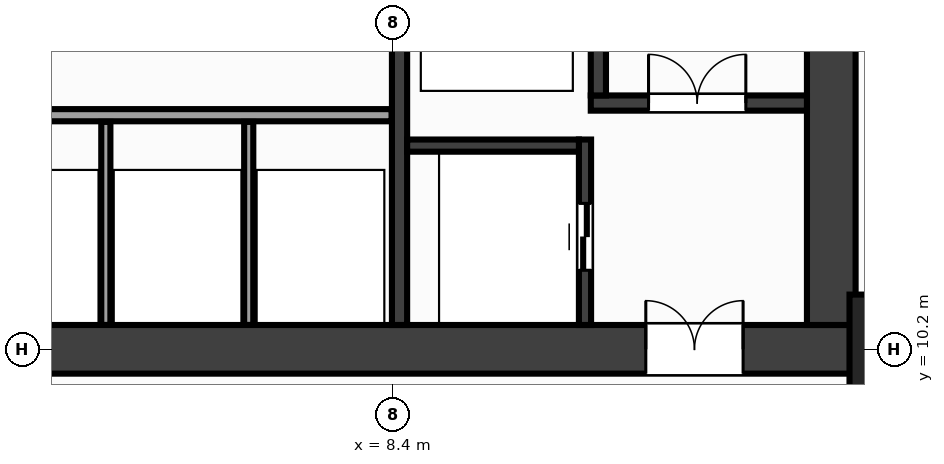
"""IFC4 building model, lengths in metres.
Left out: names, types, materials, properties, quantities, classifications, styles, units other than length and angle.
Written with IfcOpenShell. Run it as: python <this file> out.ifc"""

import sys

from ifc_helpers import new_model, si_unit, direction, frame, frame_2d, origin, origin_2d, place, context, subcontext, project, spatial, rectangle, extrude, source, transform, mapped, element, fill, save


model = new_model("IFC4")
c1 = context("Model", 3, precision=1e-05, world=origin(), true_north=direction((0.0, 1.0)))
c2 = subcontext(c1, "Body", "Model", "MODEL_VIEW")
j1 = project(units=[si_unit("LENGTHUNIT", "METRE"), si_unit("PLANEANGLEUNIT", "RADIAN")], contexts=[c1])
p1 = place(None, origin())
s1 = spatial("IfcSite", under=j1, at=p1, CompositionType="ELEMENT")
p2 = place(p1, origin())
s2 = spatial("IfcBuilding", under=s1, at=p2, CompositionType="ELEMENT")
p3 = place(p2, frame((0.0, 0.0, 66.8)))
s3 = spatial("IfcBuildingStorey", under=s2, at=p3, CompositionType="ELEMENT", Elevation=66.8)
m1 = source(origin(), c2, "Body", "SweptSolid", [
    extrude(rectangle(XDim=32.0, YDim=0.8, at=frame_2d((16.0, 0.0))), origin(), (0.0, 0.0, 1.0), 3.6),
])
p4 = place(p3, frame((-16.0, 10.2, 0.0), z_axis=(0.0, 0.0, 1.0), x_axis=(1.0, 0.0, 0.0)))
e1 = element("IfcWall", 1, at=p4, inside=s3, PredefinedType="SHEAR", context=c2, shape_type="MappedRepresentation", body=[
    mapped(m1, transform((0.0, 0.0, 0.0), x_axis=(1.0, 0.0, 0.0), y_axis=(0.0, 1.0, 0.0), z_axis=(0.0, 0.0, 1.0), scale=1.0)),
])
p5 = place(p4, frame((1.85, 0.0, 0.0)))
e2 = element("IfcOpeningElement", 2, at=p5, cuts=e1, PredefinedType="OPENING", context=c2, shape_type="SweptSolid", body=[
    extrude(rectangle(XDim=1.6, YDim=2.15, at=frame_2d((0.8, 1.075))), frame((0.0, 0.412, 0.0), z_axis=(0.0, -1.0, 0.0), x_axis=(1.0, 0.0, 0.0)), (0.0, 0.0, 1.0), 0.824),
])
p6 = place(p4, frame((28.55, 0.0, 0.0)))
e3 = element("IfcOpeningElement", 3, at=p6, cuts=e1, PredefinedType="OPENING", context=c2, shape_type="SweptSolid", body=[
    extrude(rectangle(XDim=1.6, YDim=2.15, at=frame_2d((0.8, 1.075))), frame((0.0, 0.412, 0.0), z_axis=(0.0, -1.0, 0.0), x_axis=(1.0, 0.0, 0.0)), (0.0, 0.0, 1.0), 0.824),
])
p7 = place(p4, frame((15.25, 0.0, 0.0)))
e4 = element("IfcOpeningElement", 4, at=p7, cuts=e1, PredefinedType="OPENING", context=c2, shape_type="SweptSolid", body=[
    extrude(rectangle(XDim=1.5, YDim=2.2, at=frame_2d((0.75, 1.1))), frame((0.0, 0.412, 0.0), z_axis=(0.0, -1.0, 0.0), x_axis=(1.0, 0.0, 0.0)), (0.0, 0.0, 1.0), 0.824),
])
m2 = source(origin(), c2, "Body", "SweptSolid", [
    extrude(rectangle(XDim=12.8, YDim=0.8, at=frame_2d((6.4, 0.0))), origin(), (0.0, 0.0, 1.0), 3.6),
])
p8 = place(p3, frame((15.6, 10.6, 0.0), z_axis=(0.0, 0.0, 1.0), x_axis=(0.0, 1.0, 0.0)))
e5 = element("IfcWall", 5, at=p8, inside=s3, PredefinedType="SHEAR", context=c2, shape_type="MappedRepresentation", body=[
    mapped(m2, transform((0.0, 0.0, 0.0), x_axis=(1.0, 0.0, 0.0), y_axis=(0.0, 1.0, 0.0), z_axis=(0.0, 0.0, 1.0), scale=1.0)),
])
m3 = source(origin(), c2, "Body", "SweptSolid", [
    extrude(rectangle(XDim=12.8, YDim=0.25, at=frame_2d((6.4, 0.0))), origin(), (0.0, 0.0, 1.0), 3.6),
])
p9 = place(p3, frame((8.5, 10.6, 0.0), z_axis=(0.0, 0.0, 1.0), x_axis=(0.0, 1.0, 0.0)))
e6 = element("IfcWall", 6, at=p9, inside=s3, PredefinedType="SHEAR", context=c2, shape_type="MappedRepresentation", body=[
    mapped(m3, transform((0.0, 0.0, 0.0), x_axis=(1.0, 0.0, 0.0), y_axis=(0.0, 1.0, 0.0), z_axis=(0.0, 0.0, 1.0), scale=1.0)),
])
p10 = place(p9, frame((9.85, 0.0, 0.0)))
e7 = element("IfcOpeningElement", 7, at=p10, cuts=e6, PredefinedType="OPENING", context=c2, shape_type="SweptSolid", body=[
    extrude(rectangle(XDim=0.95, YDim=2.15, at=frame_2d((0.475, 1.075))), frame((0.0, 0.137, 0.0), z_axis=(0.0, -1.0, 0.0), x_axis=(1.0, 0.0, 0.0)), (0.0, 0.0, 1.0), 0.274),
])
m4 = source(origin(), c2, "Body", "SweptSolid", [
    extrude(rectangle(XDim=3.555, YDim=0.25, at=frame_2d((1.777, 0.0))), origin(), (0.0, 0.0, 1.0), 3.6),
])
p11 = place(p3, frame((11.645, 14.25, 0.0), z_axis=(0.0, 0.0, 1.0), x_axis=(1.0, 0.0, 0.0)))
e8 = element("IfcWall", 8, at=p11, inside=s3, PredefinedType="SHEAR", context=c2, shape_type="MappedRepresentation", body=[
    mapped(m4, transform((0.0, 0.0, 0.0), x_axis=(1.0, 0.0, 0.0), y_axis=(0.0, 1.0, 0.0), z_axis=(0.0, 0.0, 1.0), scale=1.0)),
])
p12 = place(p11, frame((0.95, 0.0, 0.0)))
e9 = element("IfcOpeningElement", 9, at=p12, cuts=e8, PredefinedType="OPENING", context=c2, shape_type="SweptSolid", body=[
    extrude(rectangle(XDim=1.6, YDim=2.15, at=frame_2d((0.8, 1.075))), frame((0.0, 0.137, 0.0), z_axis=(0.0, -1.0, 0.0), x_axis=(1.0, 0.0, 0.0)), (0.0, 0.0, 1.0), 0.274),
])
m5 = source(origin(), c2, "Body", "SweptSolid", [
    extrude(rectangle(XDim=9.025, YDim=0.25, at=frame_2d((4.512, 0.0))), origin(), (0.0, 0.0, 1.0), 3.6),
])
p13 = place(p3, frame((11.77, 14.375, 0.0), z_axis=(0.0, 0.0, 1.0), x_axis=(0.0, 1.0, 0.0)))
e10 = element("IfcWall", 10, at=p13, inside=s3, PredefinedType="SHEAR", context=c2, shape_type="MappedRepresentation", body=[
    mapped(m5, transform((0.0, 0.0, 0.0), x_axis=(1.0, 0.0, 0.0), y_axis=(0.0, 1.0, 0.0), z_axis=(0.0, 0.0, 1.0), scale=1.0)),
])
m6 = source(origin(), c2, "Body", "SweptSolid", [
    extrude(rectangle(XDim=3.05, YDim=0.2, at=frame_2d((1.525, 0.0))), origin(), (0.0, 0.0, 1.0), 3.6),
])
p14 = place(p3, frame((11.55, 10.6, 0.0), z_axis=(0.0, 0.0, 1.0), x_axis=(0.0, 1.0, 0.0)))
e11 = element("IfcWall", 11, at=p14, inside=s3, PredefinedType="SHEAR", context=c2, shape_type="MappedRepresentation", body=[
    mapped(m6, transform((0.0, 0.0, 0.0), x_axis=(1.0, 0.0, 0.0), y_axis=(0.0, 1.0, 0.0), z_axis=(0.0, 0.0, 1.0), scale=1.0)),
])
p15 = place(p14, frame((0.9, 0.0, 0.0)))
e12 = element("IfcOpeningElement", 12, at=p15, cuts=e11, PredefinedType="OPENING", context=c2, shape_type="SweptSolid", body=[
    extrude(rectangle(XDim=1.1, YDim=2.15, at=frame_2d((0.55, 1.075))), frame((0.0, 0.112, 0.0), z_axis=(0.0, -1.0, 0.0), x_axis=(1.0, 0.0, 0.0)), (0.0, 0.0, 1.0), 0.224),
])
m7 = source(origin(), c2, "Body", "SweptSolid", [
    extrude(rectangle(XDim=2.825, YDim=0.2, at=frame_2d((1.413, 0.0))), origin(), (0.0, 0.0, 1.0), 3.6),
])
p16 = place(p3, frame((8.625, 13.55, 0.0), z_axis=(0.0, 0.0, 1.0), x_axis=(1.0, 0.0, 0.0)))
e13 = element("IfcWall", 13, at=p16, inside=s3, PredefinedType="SHEAR", context=c2, shape_type="MappedRepresentation", body=[
    mapped(m7, transform((0.0, 0.0, 0.0), x_axis=(1.0, 0.0, 0.0), y_axis=(0.0, 1.0, 0.0), z_axis=(0.0, 0.0, 1.0), scale=1.0)),
])
m8 = source(origin(), c2, "Body", "SweptSolid", [
    extrude(rectangle(XDim=1.8, YDim=1.8, at=origin_2d()), origin(), (0.0, 0.0, 1.0), 3.6),
])
p17 = place(p3, frame((16.8, 10.2, 0.0), z_axis=(0.0, 0.0, 1.0), x_axis=(1.0, 0.0, 0.0)))
e14 = element("IfcColumn", 14, at=p17, inside=s3, PredefinedType="COLUMN", context=c2, shape_type="MappedRepresentation", body=[
    mapped(m8, transform((0.0, 0.0, 0.0), x_axis=(1.0, 0.0, 0.0), y_axis=(0.0, 1.0, 0.0), z_axis=(0.0, 0.0, 1.0), scale=1.0)),
])
m9 = source(origin(), c2, "Body", "SweptSolid", [
    extrude(rectangle(XDim=7.07, YDim=0.2, at=frame_2d((3.535, 0.0))), origin(), (0.0, 0.0, 1.0), 3.3),
])
p18 = place(p3, frame((1.3, 14.05, 0.0), z_axis=(0.0, 0.0, 1.0), x_axis=(1.0, 0.0, 0.0)))
e15 = element("IfcWall", 15, at=p18, inside=s3, PredefinedType="PARTITIONING", context=c2, shape_type="MappedRepresentation", body=[
    mapped(m9, transform((0.0, 0.0, 0.0), x_axis=(1.0, 0.0, 0.0), y_axis=(0.0, 1.0, 0.0), z_axis=(0.0, 0.0, 1.0), scale=1.0)),
])
m10 = source(origin(), c2, "Body", "SweptSolid", [
    extrude(rectangle(XDim=3.34, YDim=0.15, at=frame_2d((1.67, 0.0))), origin(), (0.0, 0.0, 1.0), 3.3),
])
for number, where, z_axis, x_axis in (
    (16, (3.67, 10.6, 0.0), (0.0, 0.0, 1.0), (0.0, 1.0, 0.0)),
    (17, (6.02, 10.6, 0.0), (0.0, 0.0, 1.0), (0.0, 1.0, 0.0)),
):
    element("IfcWall", number, at=place(p3, frame(where, z_axis=z_axis, x_axis=x_axis)), inside=s3, PredefinedType="PARTITIONING", context=c2, shape_type="MappedRepresentation", body=[
        mapped(m10, transform((0.0, 0.0, 0.0), x_axis=(1.0, 0.0, 0.0), y_axis=(0.0, 1.0, 0.0), z_axis=(0.0, 0.0, 1.0), scale=1.0)),
    ])
m11 = source(origin(), c2, "Body", "SweptSolid", [
    extrude(rectangle(XDim=1.6, YDim=2.15, at=frame_2d((0.8, 1.075))), frame((0.0, 0.025, 0.0), z_axis=(0.0, -1.0, 0.0), x_axis=(1.0, 0.0, 0.0)), (0.0, 0.0, 1.0), 0.05),
])
p19 = place(p12, origin())
e18 = element("IfcDoor", 18, at=p19, inside=s3, OperationType="DOUBLE_DOOR_SINGLE_SWING", PredefinedType="DOOR", context=c2, shape_type="MappedRepresentation", body=[
    mapped(m11, transform((0.0, 0.0, 0.0), x_axis=(1.0, 0.0, 0.0), y_axis=(0.0, 1.0, 0.0), z_axis=(0.0, 0.0, 1.0), scale=1.0)),
])
fill(e9, e18)
p20 = place(p6, origin())
e19 = element("IfcDoor", 19, at=p20, inside=s3, OperationType="DOUBLE_DOOR_SINGLE_SWING", PredefinedType="DOOR", context=c2, shape_type="MappedRepresentation", body=[
    mapped(m11, transform((0.0, 0.0, 0.0), x_axis=(1.0, 0.0, 0.0), y_axis=(0.0, 1.0, 0.0), z_axis=(0.0, 0.0, 1.0), scale=1.0)),
])
fill(e3, e19)
m12 = source(origin(), c2, "Body", "SweptSolid", [
    extrude(rectangle(XDim=1.1, YDim=2.15, at=frame_2d((0.55, 1.075))), frame((0.0, 0.025, 0.0), z_axis=(0.0, -1.0, 0.0), x_axis=(1.0, 0.0, 0.0)), (0.0, 0.0, 1.0), 0.05),
])
p21 = place(p15, origin())
e20 = element("IfcDoor", 20, at=p21, inside=s3, OperationType="DOUBLE_DOOR_SLIDING", PredefinedType="DOOR", context=c2, shape_type="MappedRepresentation", body=[
    mapped(m12, transform((0.0, 0.0, 0.0), x_axis=(1.0, 0.0, 0.0), y_axis=(0.0, 1.0, 0.0), z_axis=(0.0, 0.0, 1.0), scale=1.0)),
])
fill(e12, e20)
save(model, sys.argv[1])
